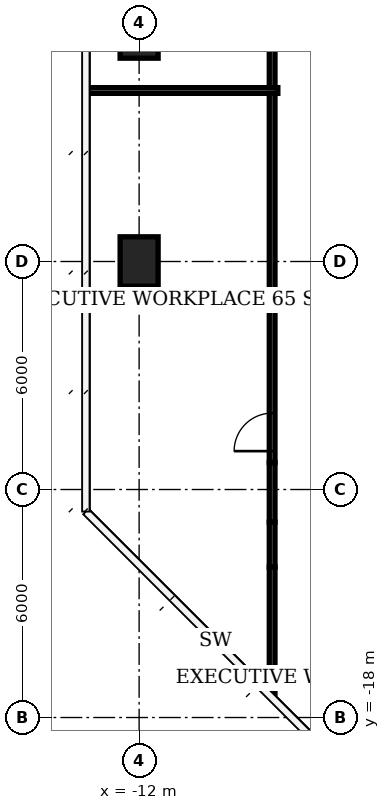
"""IFC4 building model, lengths in metres.
Left out: names, types, materials, properties, quantities, classifications, styles, units other than length and angle.
Written with IfcOpenShell. Run it as: python <this file> out.ifc"""

import sys

from ifc_helpers import new_model, si_unit, direction, frame, frame_2d, origin, origin_2d, place, context, subcontext, project, spatial, rectangle, extrude, element, fill, save


model = new_model("IFC4")
c1 = context("Model", 3, precision=1e-05, world=origin(), true_north=direction((0.0, 1.0)))
c2 = subcontext(c1, "Body", "Model", "MODEL_VIEW")
j1 = project(units=[si_unit("LENGTHUNIT", "METRE"), si_unit("PLANEANGLEUNIT", "RADIAN")], contexts=[c1])
p1 = place(None, origin())
s1 = spatial("IfcSite", under=j1, at=p1, CompositionType="ELEMENT")
p2 = place(p1, origin())
s2 = spatial("IfcBuilding", under=s1, at=p2, CompositionType="ELEMENT")
p3 = place(p2, frame((0.0, 0.0, 280.1)))
s3 = spatial("IfcBuildingStorey", under=s2, at=p3, CompositionType="ELEMENT", Elevation=280.1)
for number, where, z_axis, x_axis in (
    (1, (-12.0, -6.0, 0.0), (0.0, 0.0, 1.0), (0.0, 1.0, 0.0)),
    (2, (-12.0, 0.0, 0.0), (0.0, 0.0, 1.0), (0.0, 1.0, 0.0)),
):
    element("IfcColumn", number, at=place(p3, frame(where, z_axis=z_axis, x_axis=x_axis)), inside=s3, PredefinedType="COLUMN", context=c2, shape_type="SweptSolid", body=[
        extrude(rectangle(XDim=1.3, YDim=1.0, at=origin_2d()), origin(), (0.0, 0.0, 1.0), 3.9),
    ])
p4 = place(p3, frame((-13.375, -1.5, 0.0), z_axis=(0.0, 0.0, 1.0), x_axis=(1.0, 0.0, 0.0)))
e3 = element("IfcWall", 3, at=p4, inside=s3, PredefinedType="PARTITIONING", context=c2, shape_type="SweptSolid", body=[
    extrude(rectangle(XDim=5.025, YDim=0.15, at=frame_2d((2.512, 0.0))), origin(), (0.0, 0.0, 1.0), 3.65),
])
p5 = place(p3, frame((-8.5, -17.363, 0.0), z_axis=(0.0, 0.0, 1.0), x_axis=(0.0, 1.0, 0.0)))
e4 = element("IfcWall", 4, at=p5, inside=s3, PredefinedType="PARTITIONING", context=c2, shape_type="SweptSolid", body=[
    extrude(rectangle(XDim=3.323, YDim=0.15, at=frame_2d((1.662, 0.0))), origin(), (0.0, 0.0, 1.0), 3.65),
])
p6 = place(p3, frame((-8.5, -14.04, 0.0), z_axis=(0.0, 0.0, 1.0), x_axis=(0.0, 1.0, 0.0)))
e5 = element("IfcWall", 5, at=p6, inside=s3, PredefinedType="PARTITIONING", context=c2, shape_type="SweptSolid", body=[
    extrude(rectangle(XDim=1.18, YDim=0.15, at=frame_2d((0.59, 0.0))), origin(), (0.0, 0.0, 1.0), 2.65),
])
p7 = place(p3, frame((-8.5, -12.86, 0.0), z_axis=(0.0, 0.0, 1.0), x_axis=(0.0, 1.0, 0.0)))
e6 = element("IfcWall", 6, at=p7, inside=s3, PredefinedType="PARTITIONING", context=c2, shape_type="SweptSolid", body=[
    extrude(rectangle(XDim=1.57, YDim=0.15, at=frame_2d((0.785, 0.0))), origin(), (0.0, 0.0, 1.0), 2.65),
])
p8 = place(p3, frame((-8.5, -11.29, 0.0), z_axis=(0.0, 0.0, 1.0), x_axis=(0.0, 1.0, 0.0)))
e7 = element("IfcWall", 7, at=p8, inside=s3, PredefinedType="PARTITIONING", context=c2, shape_type="SweptSolid", body=[
    extrude(rectangle(XDim=9.715, YDim=0.15, at=frame_2d((4.857, 0.0))), origin(), (0.0, 0.0, 1.0), 3.65),
])
p9 = place(p8, frame((0.3, 0.0, 0.0)))
e8 = element("IfcOpeningElement", 8, at=p9, cuts=e7, PredefinedType="OPENING", context=c2, shape_type="SweptSolid", body=[
    extrude(rectangle(XDim=1.0, YDim=2.4, at=frame_2d((0.5, 1.2))), frame((0.0, 0.085, 0.0), z_axis=(0.0, -1.0, 0.0), x_axis=(1.0, 0.0, 0.0)), (0.0, 0.0, 1.0), 0.17),
])
p10 = place(p3, frame((-8.5, -1.425, 0.0), z_axis=(0.0, 0.0, 1.0), x_axis=(0.0, 1.0, 0.0)))
e9 = element("IfcWall", 9, at=p10, inside=s3, PredefinedType="PARTITIONING", context=c2, shape_type="SweptSolid", body=[
    extrude(rectangle(XDim=18.788, YDim=0.15, at=frame_2d((9.394, 0.0))), origin(), (0.0, 0.0, 1.0), 3.65),
])
p11 = place(p10, frame((6.018, 0.0, 0.0)))
e10 = element("IfcOpeningElement", 10, at=p11, cuts=e9, PredefinedType="OPENING", context=c2, shape_type="SweptSolid", body=[
    extrude(rectangle(XDim=1.0, YDim=2.4, at=frame_2d((0.5, 1.2))), frame((0.0, 0.085, 0.0), z_axis=(0.0, -1.0, 0.0), x_axis=(1.0, 0.0, 0.0)), (0.0, 0.0, 1.0), 0.17),
])
p12 = place(p9, origin())
e11 = element("IfcDoor", 11, at=p12, inside=s3, OperationType="SINGLE_SWING_LEFT", PredefinedType="DOOR", context=c2, shape_type="SweptSolid", body=[
    extrude(rectangle(XDim=1.0, YDim=2.4, at=frame_2d((0.5, 1.2))), frame((0.0, 0.025, 0.0), z_axis=(0.0, -1.0, 0.0), x_axis=(1.0, 0.0, 0.0)), (0.0, 0.0, 1.0), 0.05),
])
fill(e8, e11)
save(model, sys.argv[1])
